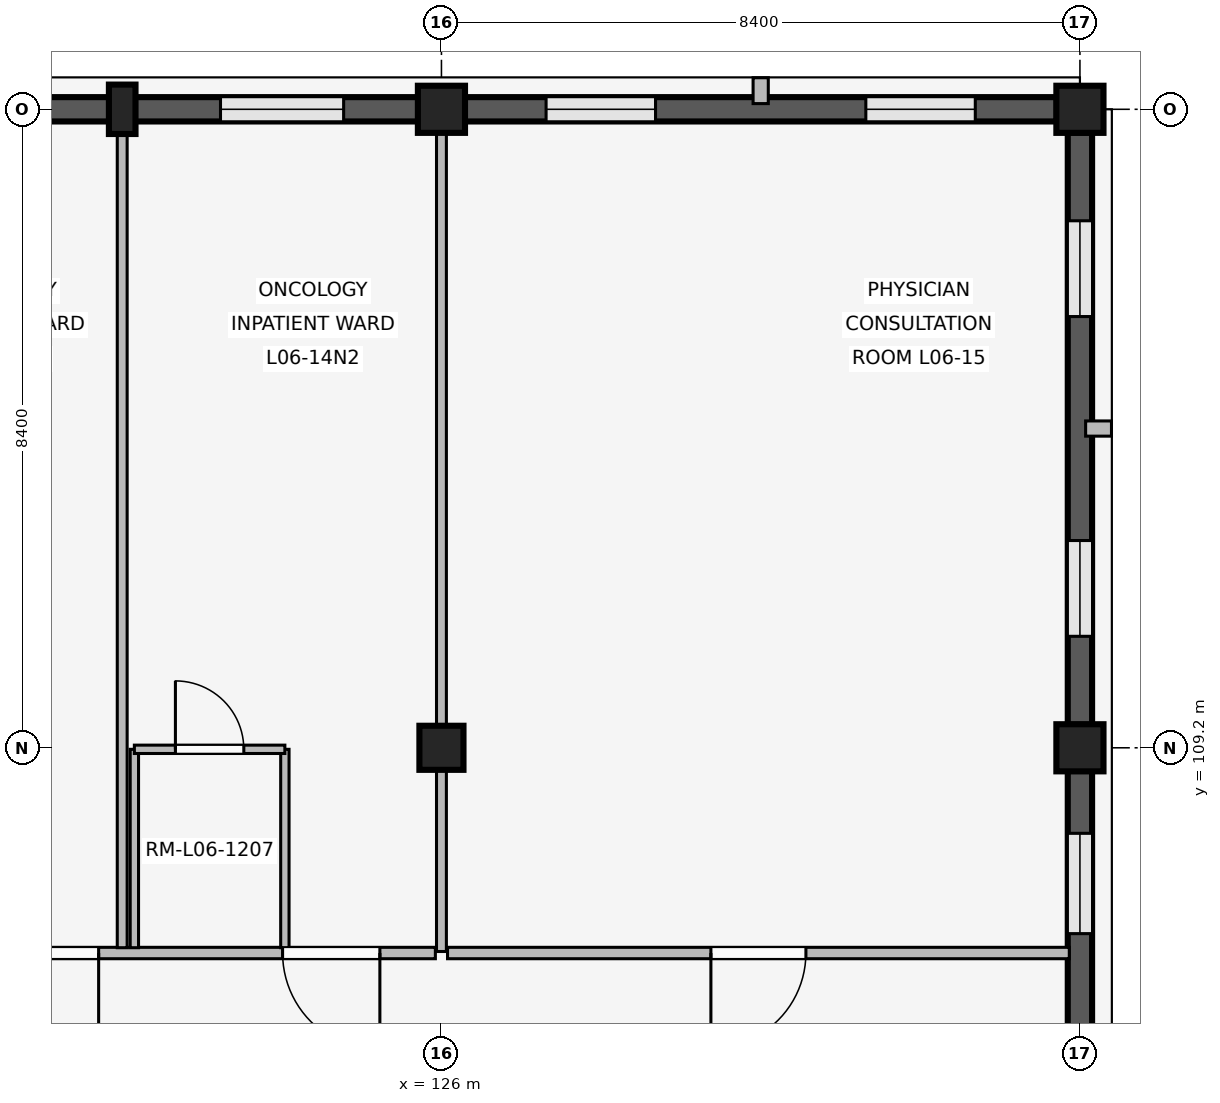
"""IFC4 building model, lengths in metres.
Left out: names, types, materials, properties, quantities, classifications, styles, units other than length and angle.
Written with IfcOpenShell. Run it as: python <this file> out.ifc"""

import sys

from ifc_helpers import new_model, si_unit, direction, frame, frame_2d, origin, origin_2d, place, context, subcontext, project, spatial, rectangle, extrude, element, fill, save


model = new_model("IFC4")
c1 = context("Model", 3, precision=1e-05, world=origin(), true_north=direction((0.0, 1.0)))
c2 = subcontext(c1, "Body", "Model", "MODEL_VIEW")
j1 = project(units=[si_unit("LENGTHUNIT", "METRE"), si_unit("PLANEANGLEUNIT", "RADIAN")], contexts=[c1])
p1 = place(None, origin())
s1 = spatial("IfcSite", under=j1, at=p1, CompositionType="ELEMENT")
p2 = place(p1, origin())
s2 = spatial("IfcBuilding", under=s1, at=p2, CompositionType="ELEMENT")
p3 = place(p2, frame((0.0, 0.0, 24.6)))
s3 = spatial("IfcBuildingStorey", under=s2, at=p3, CompositionType="ELEMENT", Elevation=24.6)
p4 = place(p3, frame((126.0, 109.2, 0.0), z_axis=(0.0, 0.0, 1.0), x_axis=(1.0, 0.0, 0.0)))
e1 = element("IfcColumn", 1, at=p4, inside=s3, PredefinedType="COLUMN", context=c2, shape_type="SweptSolid", body=[
    extrude(rectangle(XDim=0.58, YDim=0.58, at=origin_2d()), origin(), (0.0, 0.0, 1.0), 4.2),
])
for number, where, z_axis, x_axis in (
    (2, (126.0, 117.6, 0.0), (0.0, 0.0, 1.0), (1.0, 0.0, 0.0)),
    (3, (134.4, 109.2, 0.0), (0.0, 0.0, 1.0), (1.0, 0.0, 0.0)),
    (4, (134.4, 117.6, 0.0), (0.0, 0.0, 1.0), (1.0, 0.0, 0.0)),
):
    element("IfcColumn", number, at=place(p3, frame(where, z_axis=z_axis, x_axis=x_axis)), inside=s3, PredefinedType="COLUMN", context=c2, shape_type="SweptSolid", body=[
        extrude(rectangle(XDim=0.62, YDim=0.62, at=origin_2d()), origin(), (0.0, 0.0, 1.0), 4.2),
    ])
p5 = place(p3, frame((121.8, 117.6, 0.0), z_axis=(0.0, 0.0, 1.0), x_axis=(1.0, 0.0, 0.0)))
e5 = element("IfcColumn", 5, at=p5, inside=s3, PredefinedType="PILASTER", context=c2, shape_type="SweptSolid", body=[
    extrude(rectangle(XDim=0.35, YDim=0.65, at=origin_2d()), origin(), (0.0, 0.0, 1.0), 4.2),
])
p6 = place(p3, frame((117.905, 117.6, 0.0), z_axis=(0.0, 0.0, 1.0), x_axis=(1.0, 0.0, 0.0)))
e6 = element("IfcWall", 6, at=p6, inside=s3, PredefinedType="SOLIDWALL", context=c2, shape_type="SweptSolid", body=[
    extrude(rectangle(XDim=7.79, YDim=0.32, at=frame_2d((3.895, 0.0))), origin(), (0.0, 0.0, 1.0), 3.34),
])
p7 = place(p6, frame((0.982, 0.0, 0.85)))
e7 = element("IfcOpeningElement", 7, at=p7, cuts=e6, PredefinedType="OPENING", context=c2, shape_type="SweptSolid", body=[
    extrude(rectangle(XDim=1.62, YDim=1.8, at=frame_2d((0.81, 0.9))), frame((0.0, 0.17, 0.0), z_axis=(0.0, -1.0, 0.0), x_axis=(1.0, 0.0, 0.0)), (0.0, 0.0, 1.0), 0.34),
])
p8 = place(p6, frame((5.188, 0.0, 0.85)))
e8 = element("IfcOpeningElement", 8, at=p8, cuts=e6, PredefinedType="OPENING", context=c2, shape_type="SweptSolid", body=[
    extrude(rectangle(XDim=1.62, YDim=1.8, at=frame_2d((0.81, 0.9))), frame((0.0, 0.17, 0.0), z_axis=(0.0, -1.0, 0.0), x_axis=(1.0, 0.0, 0.0)), (0.0, 0.0, 1.0), 0.34),
])
p9 = place(p3, frame((134.4, 108.895, 0.0), z_axis=(0.0, 0.0, 1.0), x_axis=(0.0, -1.0, 0.0)))
e9 = element("IfcWall", 9, at=p9, inside=s3, PredefinedType="SOLIDWALL", context=c2, shape_type="SweptSolid", body=[
    extrude(rectangle(XDim=7.79, YDim=0.32, at=frame_2d((3.895, 0.0))), origin(), (0.0, 0.0, 1.0), 3.34),
])
p10 = place(p9, frame((0.82, 0.0, 0.85)))
e10 = element("IfcOpeningElement", 10, at=p10, cuts=e9, PredefinedType="OPENING", context=c2, shape_type="SweptSolid", body=[
    extrude(rectangle(XDim=1.32, YDim=1.58, at=frame_2d((0.66, 0.79))), frame((0.0, 0.17, 0.0), z_axis=(0.0, -1.0, 0.0), x_axis=(1.0, 0.0, 0.0)), (0.0, 0.0, 1.0), 0.34),
])
p11 = place(p9, frame((5.65, 0.0, 0.85)))
e11 = element("IfcOpeningElement", 11, at=p11, cuts=e9, PredefinedType="OPENING", context=c2, shape_type="SweptSolid", body=[
    extrude(rectangle(XDim=1.32, YDim=1.58, at=frame_2d((0.66, 0.79))), frame((0.0, 0.17, 0.0), z_axis=(0.0, -1.0, 0.0), x_axis=(1.0, 0.0, 0.0)), (0.0, 0.0, 1.0), 0.34),
])
p12 = place(p3, frame((126.305, 117.6, 0.0), z_axis=(0.0, 0.0, 1.0), x_axis=(1.0, 0.0, 0.0)))
e12 = element("IfcWall", 12, at=p12, inside=s3, PredefinedType="SOLIDWALL", context=c2, shape_type="SweptSolid", body=[
    extrude(rectangle(XDim=7.79, YDim=0.32, at=frame_2d((3.895, 0.0))), origin(), (0.0, 0.0, 1.0), 3.34),
])
p13 = place(p12, frame((1.072, 0.0, 0.85)))
e13 = element("IfcOpeningElement", 13, at=p13, cuts=e12, PredefinedType="OPENING", context=c2, shape_type="SweptSolid", body=[
    extrude(rectangle(XDim=1.44, YDim=1.62, at=frame_2d((0.72, 0.81))), frame((0.0, 0.17, 0.0), z_axis=(0.0, -1.0, 0.0), x_axis=(1.0, 0.0, 0.0)), (0.0, 0.0, 1.0), 0.34),
])
p14 = place(p12, frame((5.278, 0.0, 0.85)))
e14 = element("IfcOpeningElement", 14, at=p14, cuts=e12, PredefinedType="OPENING", context=c2, shape_type="SweptSolid", body=[
    extrude(rectangle(XDim=1.44, YDim=1.62, at=frame_2d((0.72, 0.81))), frame((0.0, 0.17, 0.0), z_axis=(0.0, -1.0, 0.0), x_axis=(1.0, 0.0, 0.0)), (0.0, 0.0, 1.0), 0.34),
])
p15 = place(p3, frame((130.2, 117.675, 0.0), z_axis=(0.0, 0.0, 1.0), x_axis=(0.0, 1.0, 0.0)))
e15 = element("IfcWall", 15, at=p15, inside=s3, PredefinedType="ELEMENTEDWALL", context=c2, shape_type="SweptSolid", body=[
    extrude(rectangle(XDim=0.34, YDim=0.2, at=frame_2d((0.17, 0.0))), origin(), (0.0, 0.0, 1.0), 3.32),
])
p16 = place(p3, frame((134.4, 117.295, 0.0), z_axis=(0.0, 0.0, 1.0), x_axis=(0.0, -1.0, 0.0)))
e16 = element("IfcWall", 16, at=p16, inside=s3, PredefinedType="SOLIDWALL", context=c2, shape_type="SweptSolid", body=[
    extrude(rectangle(XDim=7.79, YDim=0.32, at=frame_2d((3.895, 0.0))), origin(), (0.0, 0.0, 1.0), 3.34),
])
p17 = place(p16, frame((1.162, 0.0, 0.85)))
e17 = element("IfcOpeningElement", 17, at=p17, cuts=e16, PredefinedType="OPENING", context=c2, shape_type="SweptSolid", body=[
    extrude(rectangle(XDim=1.26, YDim=1.52, at=frame_2d((0.63, 0.76))), frame((0.0, 0.17, 0.0), z_axis=(0.0, -1.0, 0.0), x_axis=(1.0, 0.0, 0.0)), (0.0, 0.0, 1.0), 0.34),
])
p18 = place(p16, frame((5.368, 0.0, 0.85)))
e18 = element("IfcOpeningElement", 18, at=p18, cuts=e16, PredefinedType="OPENING", context=c2, shape_type="SweptSolid", body=[
    extrude(rectangle(XDim=1.26, YDim=1.52, at=frame_2d((0.63, 0.76))), frame((0.0, 0.17, 0.0), z_axis=(0.0, -1.0, 0.0), x_axis=(1.0, 0.0, 0.0)), (0.0, 0.0, 1.0), 0.34),
])
p19 = place(p3, frame((134.475, 113.4, 0.0), z_axis=(0.0, 0.0, 1.0), x_axis=(1.0, 0.0, 0.0)))
e19 = element("IfcWall", 19, at=p19, inside=s3, PredefinedType="ELEMENTEDWALL", context=c2, shape_type="SweptSolid", body=[
    extrude(rectangle(XDim=0.34, YDim=0.2, at=frame_2d((0.17, 0.0))), origin(), (0.0, 0.0, 1.0), 3.32),
])
p20 = place(p3, frame((125.92, 106.5, 0.0), z_axis=(0.0, 0.0, 1.0), x_axis=(-1.0, 0.0, 0.0)))
e20 = element("IfcWall", 20, at=p20, inside=s3, PredefinedType="PARTITIONING", context=c2, shape_type="SweptSolid", body=[
    extrude(rectangle(XDim=8.24, YDim=0.15, at=frame_2d((4.12, 0.0))), origin(), (0.0, 0.0, 1.0), 3.32),
])
p21 = place(p20, frame((0.73, 0.0, 0.0)))
e21 = element("IfcOpeningElement", 21, at=p21, cuts=e20, PredefinedType="OPENING", context=c2, shape_type="SweptSolid", body=[
    extrude(rectangle(XDim=1.28, YDim=2.2, at=frame_2d((0.64, 1.1))), frame((0.0, 0.085, 0.0), z_axis=(0.0, -1.0, 0.0), x_axis=(1.0, 0.0, 0.0)), (0.0, 0.0, 1.0), 0.17),
])
p22 = place(p20, frame((4.43, 0.0, 0.0)))
e22 = element("IfcOpeningElement", 22, at=p22, cuts=e20, PredefinedType="OPENING", context=c2, shape_type="SweptSolid", body=[
    extrude(rectangle(XDim=1.28, YDim=2.2, at=frame_2d((0.64, 1.1))), frame((0.0, 0.085, 0.0), z_axis=(0.0, -1.0, 0.0), x_axis=(1.0, 0.0, 0.0)), (0.0, 0.0, 1.0), 0.17),
])
p23 = place(p3, frame((121.8, 106.57, 0.0), z_axis=(0.0, 0.0, 1.0), x_axis=(0.0, 1.0, 0.0)))
e23 = element("IfcWall", 23, at=p23, inside=s3, PredefinedType="PARTITIONING", context=c2, shape_type="SweptSolid", body=[
    extrude(rectangle(XDim=10.93, YDim=0.13, at=frame_2d((5.465, 0.0))), origin(), (0.0, 0.0, 1.0), 3.32),
])
for number, where, z_axis, x_axis in (
    (24, (121.96, 106.57, 0.0), (0.0, 0.0, 1.0), (0.0, 1.0, 0.0)),
    (25, (123.94, 106.57, 0.0), (0.0, 0.0, 1.0), (0.0, 1.0, 0.0)),
):
    element("IfcWall", number, at=place(p3, frame(where, z_axis=z_axis, x_axis=x_axis)), inside=s3, PredefinedType="PARTITIONING", context=c2, shape_type="SweptSolid", body=[
        extrude(rectangle(XDim=2.61, YDim=0.11, at=frame_2d((1.305, 0.0))), origin(), (0.0, 0.0, 1.0), 3.32),
    ])
p24 = place(p3, frame((121.96, 109.18, 0.0), z_axis=(0.0, 0.0, 1.0), x_axis=(1.0, 0.0, 0.0)))
e26 = element("IfcWall", 26, at=p24, inside=s3, PredefinedType="PARTITIONING", context=c2, shape_type="SweptSolid", body=[
    extrude(rectangle(XDim=1.98, YDim=0.11, at=frame_2d((0.99, 0.0))), origin(), (0.0, 0.0, 1.0), 3.32),
])
p25 = place(p24, frame((0.54, 0.0, 0.0)))
e27 = element("IfcOpeningElement", 27, at=p25, cuts=e26, PredefinedType="OPENING", context=c2, shape_type="SweptSolid", body=[
    extrude(rectangle(XDim=0.9, YDim=2.1, at=frame_2d((0.45, 1.05))), frame((0.0, 0.065, 0.0), z_axis=(0.0, -1.0, 0.0), x_axis=(1.0, 0.0, 0.0)), (0.0, 0.0, 1.0), 0.13),
])
p26 = place(p3, frame((126.0, 106.52, 0.0), z_axis=(0.0, 0.0, 1.0), x_axis=(0.0, 1.0, 0.0)))
e28 = element("IfcWall", 28, at=p26, inside=s3, PredefinedType="PARTITIONING", context=c2, shape_type="SweptSolid", body=[
    extrude(rectangle(XDim=10.94, YDim=0.13, at=frame_2d((5.47, 0.0))), origin(), (0.0, 0.0, 1.0), 3.32),
])
p27 = place(p3, frame((134.26, 106.5, 0.0), z_axis=(0.0, 0.0, 1.0), x_axis=(-1.0, 0.0, 0.0)))
e29 = element("IfcWall", 29, at=p27, inside=s3, PredefinedType="PARTITIONING", context=c2, shape_type="SweptSolid", body=[
    extrude(rectangle(XDim=8.18, YDim=0.15, at=frame_2d((4.09, 0.0))), origin(), (0.0, 0.0, 1.0), 3.32),
])
p28 = place(p27, frame((3.465, 0.0, 0.0)))
e30 = element("IfcOpeningElement", 30, at=p28, cuts=e29, PredefinedType="OPENING", context=c2, shape_type="SweptSolid", body=[
    extrude(rectangle(XDim=1.25, YDim=2.2, at=frame_2d((0.625, 1.1))), frame((0.0, 0.085, 0.0), z_axis=(0.0, -1.0, 0.0), x_axis=(1.0, 0.0, 0.0)), (0.0, 0.0, 1.0), 0.17),
])
p29 = place(p8, origin())
e31 = element("IfcWindow", 31, at=p29, inside=s3, PartitioningType="SINGLE_PANEL", PredefinedType="WINDOW", context=c2, shape_type="SweptSolid", body=[
    extrude(rectangle(XDim=1.62, YDim=1.8, at=frame_2d((0.81, 0.9))), frame((0.0, 0.03, 0.0), z_axis=(0.0, -1.0, 0.0), x_axis=(1.0, 0.0, 0.0)), (0.0, 0.0, 1.0), 0.06),
])
fill(e8, e31)
p30 = place(p10, origin())
e32 = element("IfcWindow", 32, at=p30, inside=s3, PartitioningType="SINGLE_PANEL", PredefinedType="WINDOW", context=c2, shape_type="SweptSolid", body=[
    extrude(rectangle(XDim=1.32, YDim=1.58, at=frame_2d((0.66, 0.79))), frame((0.0, 0.03, 0.0), z_axis=(0.0, -1.0, 0.0), x_axis=(1.0, 0.0, 0.0)), (0.0, 0.0, 1.0), 0.06),
])
fill(e10, e32)
p31 = place(p13, origin())
e33 = element("IfcWindow", 33, at=p31, inside=s3, PartitioningType="SINGLE_PANEL", PredefinedType="WINDOW", context=c2, shape_type="SweptSolid", body=[
    extrude(rectangle(XDim=1.44, YDim=1.62, at=frame_2d((0.72, 0.81))), frame((0.0, 0.03, 0.0), z_axis=(0.0, -1.0, 0.0), x_axis=(1.0, 0.0, 0.0)), (0.0, 0.0, 1.0), 0.06),
])
fill(e13, e33)
p32 = place(p14, origin())
e34 = element("IfcWindow", 34, at=p32, inside=s3, PartitioningType="SINGLE_PANEL", PredefinedType="WINDOW", context=c2, shape_type="SweptSolid", body=[
    extrude(rectangle(XDim=1.44, YDim=1.62, at=frame_2d((0.72, 0.81))), frame((0.0, 0.03, 0.0), z_axis=(0.0, -1.0, 0.0), x_axis=(1.0, 0.0, 0.0)), (0.0, 0.0, 1.0), 0.06),
])
fill(e14, e34)
p33 = place(p17, origin())
e35 = element("IfcWindow", 35, at=p33, inside=s3, PartitioningType="SINGLE_PANEL", PredefinedType="WINDOW", context=c2, shape_type="SweptSolid", body=[
    extrude(rectangle(XDim=1.26, YDim=1.52, at=frame_2d((0.63, 0.76))), frame((0.0, 0.03, 0.0), z_axis=(0.0, -1.0, 0.0), x_axis=(1.0, 0.0, 0.0)), (0.0, 0.0, 1.0), 0.06),
])
fill(e17, e35)
p34 = place(p18, origin())
e36 = element("IfcWindow", 36, at=p34, inside=s3, PartitioningType="SINGLE_PANEL", PredefinedType="WINDOW", context=c2, shape_type="SweptSolid", body=[
    extrude(rectangle(XDim=1.26, YDim=1.52, at=frame_2d((0.63, 0.76))), frame((0.0, 0.03, 0.0), z_axis=(0.0, -1.0, 0.0), x_axis=(1.0, 0.0, 0.0)), (0.0, 0.0, 1.0), 0.06),
])
fill(e18, e36)
p35 = place(p21, origin())
e37 = element("IfcDoor", 37, at=p35, inside=s3, OperationType="SINGLE_SWING_LEFT", PredefinedType="DOOR", context=c2, shape_type="SweptSolid", body=[
    extrude(rectangle(XDim=1.28, YDim=2.2, at=frame_2d((0.64, 1.1))), frame((0.0, 0.025, 0.0), z_axis=(0.0, -1.0, 0.0), x_axis=(1.0, 0.0, 0.0)), (0.0, 0.0, 1.0), 0.05),
])
fill(e21, e37)
p36 = place(p22, origin())
e38 = element("IfcDoor", 38, at=p36, inside=s3, OperationType="SINGLE_SWING_LEFT", PredefinedType="DOOR", context=c2, shape_type="SweptSolid", body=[
    extrude(rectangle(XDim=1.28, YDim=2.2, at=frame_2d((0.64, 1.1))), frame((0.0, 0.025, 0.0), z_axis=(0.0, -1.0, 0.0), x_axis=(1.0, 0.0, 0.0)), (0.0, 0.0, 1.0), 0.05),
])
fill(e22, e38)
p37 = place(p25, origin())
e39 = element("IfcDoor", 39, at=p37, inside=s3, OperationType="SINGLE_SWING_LEFT", PredefinedType="DOOR", context=c2, shape_type="SweptSolid", body=[
    extrude(rectangle(XDim=0.9, YDim=2.1, at=frame_2d((0.45, 1.05))), frame((0.0, 0.025, 0.0), z_axis=(0.0, -1.0, 0.0), x_axis=(1.0, 0.0, 0.0)), (0.0, 0.0, 1.0), 0.05),
])
fill(e27, e39)
p38 = place(p28, origin())
e40 = element("IfcDoor", 40, at=p38, inside=s3, OperationType="SINGLE_SWING_RIGHT", PredefinedType="DOOR", context=c2, shape_type="SweptSolid", body=[
    extrude(rectangle(XDim=1.25, YDim=2.2, at=frame_2d((0.625, 1.1))), frame((0.0, 0.025, 0.0), z_axis=(0.0, -1.0, 0.0), x_axis=(1.0, 0.0, 0.0)), (0.0, 0.0, 1.0), 0.05),
])
fill(e30, e40)
save(model, sys.argv[1])
